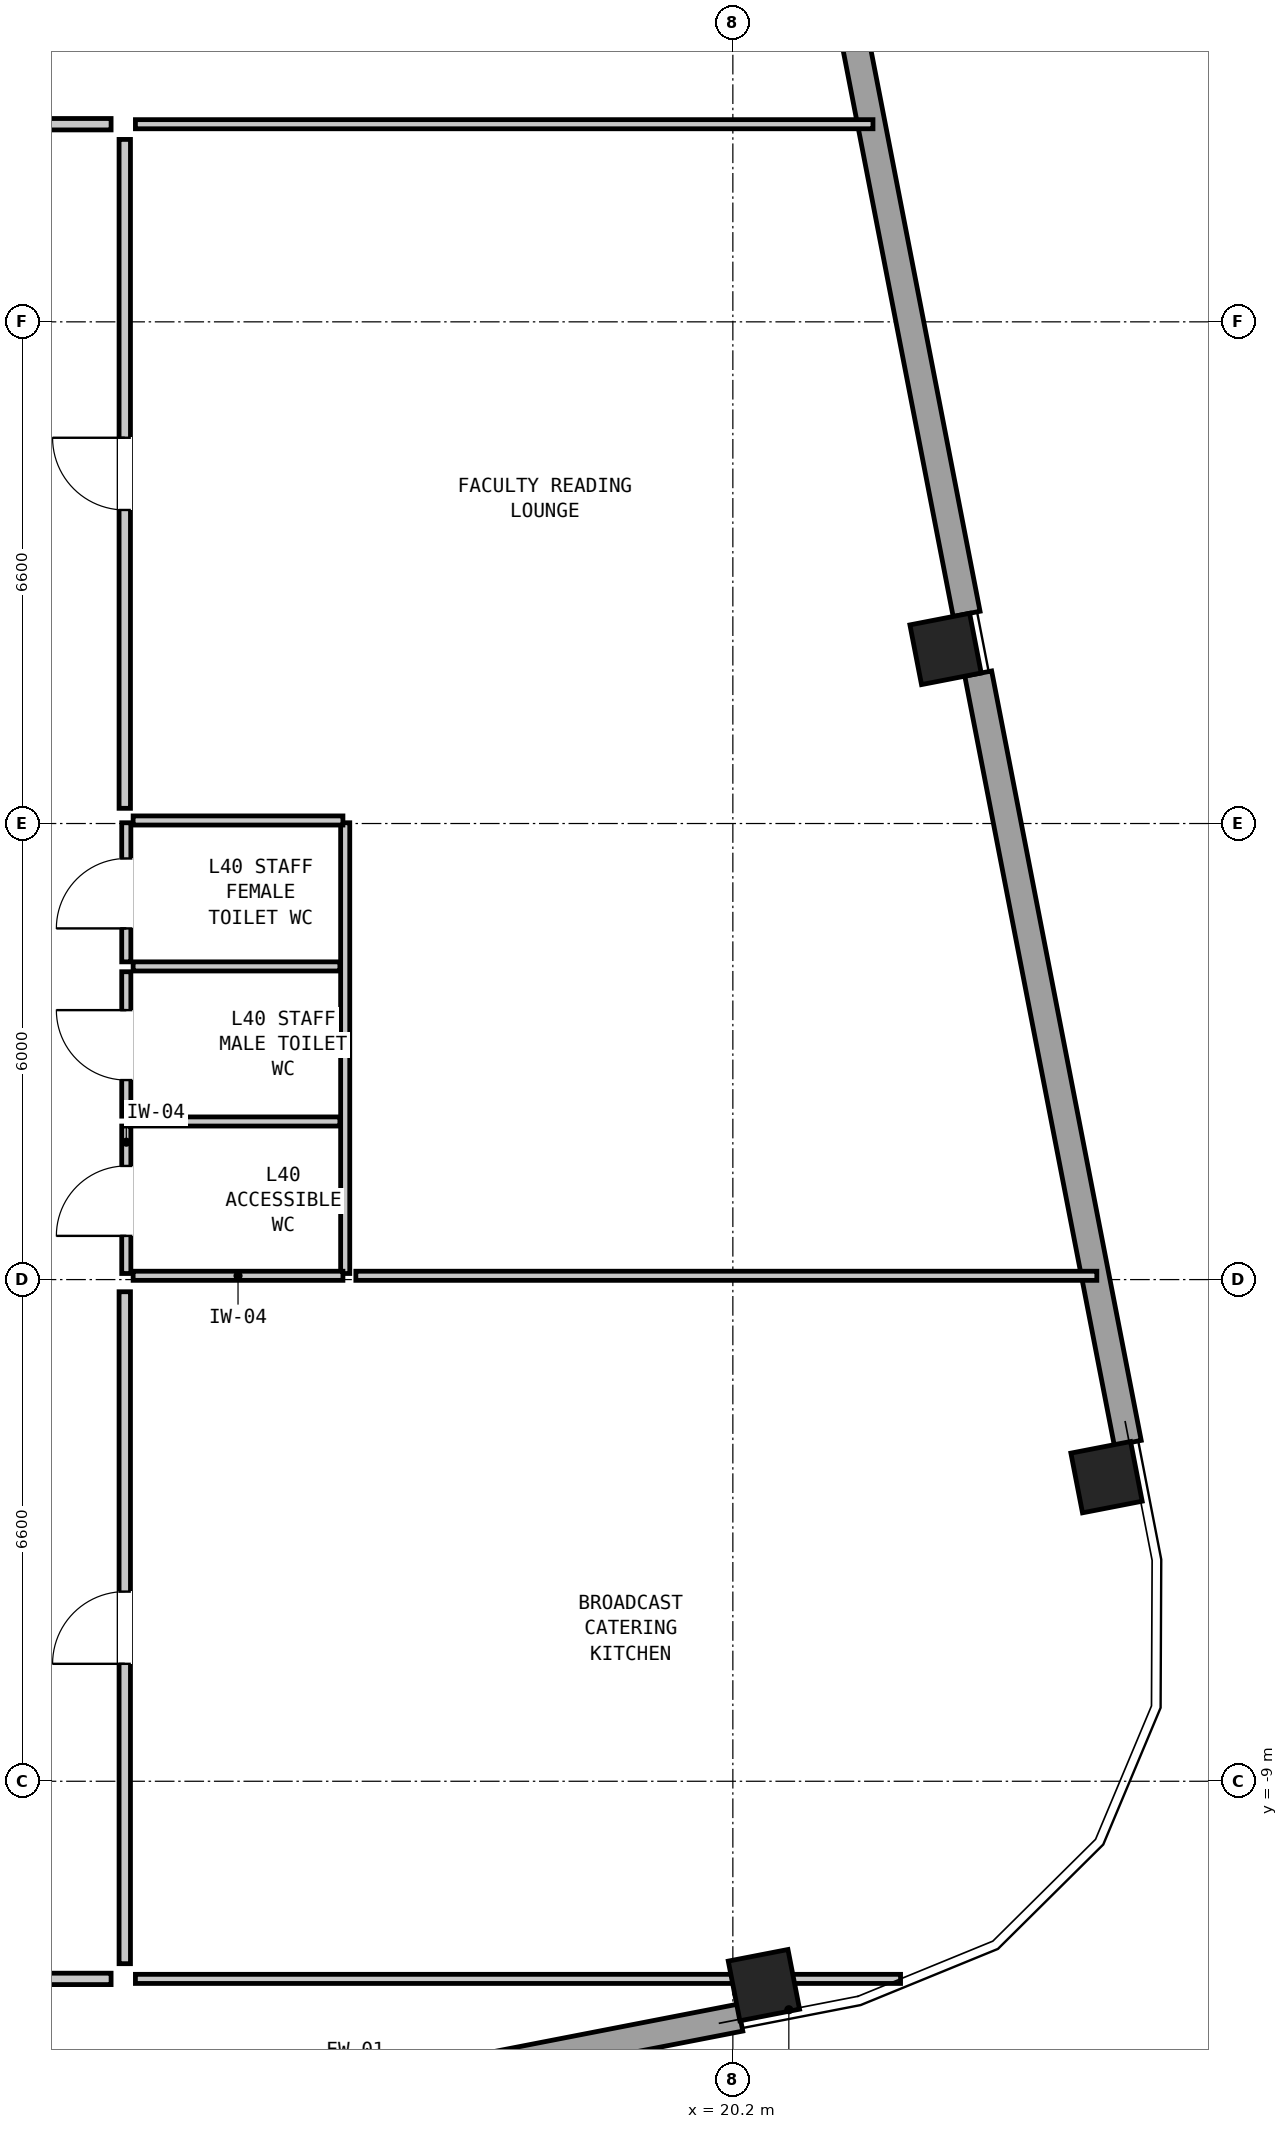
"""IFC4 building model, lengths in metres.
Left out: names, types, materials, properties, quantities, classifications, styles, units other than length and angle.
Written with IfcOpenShell. Run it as: python <this file> out.ifc"""

import sys

from ifc_helpers import new_model, si_unit, direction, frame, frame_2d, origin, origin_2d, place, context, subcontext, project, spatial, rectangle, hollow_rectangle, extrude, element, fill, save


model = new_model("IFC4")
c1 = context("Model", 3, precision=1e-05, world=origin(), true_north=direction((0.0, 1.0)))
c2 = subcontext(c1, "Body", "Model", "MODEL_VIEW")
j1 = project(units=[si_unit("LENGTHUNIT", "METRE"), si_unit("PLANEANGLEUNIT", "RADIAN")], contexts=[c1])
p1 = place(None, origin())
s1 = spatial("IfcSite", under=j1, at=p1, CompositionType="ELEMENT")
p2 = place(p1, origin())
s2 = spatial("IfcBuilding", under=s1, at=p2, CompositionType="ELEMENT")
p3 = place(p2, frame((0.0, 0.0, 137.2)))
s3 = spatial("IfcBuildingStorey", under=s2, at=p3, CompositionType="ELEMENT", Elevation=137.2)
for number, where, z_axis, x_axis in (
    (1, (20.609, -11.682, 0.0), (0.0, 0.0, 1.0), (0.982, 0.191, 0.0)),
    (2, (25.116, -5.0, 0.0), (0.0, 0.0, 1.0), (-0.191, 0.982, 0.0)),
    (3, (22.998, 5.896, 0.0), (0.0, 0.0, 1.0), (-0.191, 0.982, 0.0)),
):
    element("IfcColumn", number, at=place(p3, frame(where, z_axis=z_axis, x_axis=x_axis)), inside=s3, PredefinedType="COLUMN", context=c2, shape_type="SweptSolid", body=[
        extrude(hollow_rectangle(XDim=0.8, YDim=0.8, WallThickness=0.05, at=origin_2d()), origin(), (0.0, 0.0, 1.0), 3.05),
    ])
p4 = place(p3, frame((20.296, -12.11, 0.0), z_axis=(0.0, 0.0, 1.0), x_axis=(-0.981628941133, -0.190799952646, 0.0)))
e4 = element("IfcWall", 4, at=p4, inside=s3, PredefinedType="SOLIDWALL", context=c2, shape_type="SweptSolid", body=[
    extrude(rectangle(XDim=10.312, YDim=0.36, at=frame_2d((5.156, 0.0))), origin(), (0.0, 0.0, 1.0), 0.95),
])
p5 = place(p3, frame((21.31, 16.469, 0.0), z_axis=(0.0, 0.0, 1.0), x_axis=(0.190811924826, -0.981626614016, 0.0)))
e5 = element("IfcWall", 5, at=p5, inside=s3, PredefinedType="SOLIDWALL", context=c2, shape_type="SweptSolid", body=[
    extrude(rectangle(XDim=10.3, YDim=0.36, at=frame_2d((5.15, 0.0))), origin(), (0.0, 0.0, 1.0), 0.95),
])
p6 = place(p3, frame((23.428, 5.573, 0.0), z_axis=(0.0, 0.0, 1.0), x_axis=(0.190827200853, -0.981623644486, 0.0)))
e6 = element("IfcWall", 6, at=p6, inside=s3, PredefinedType="SOLIDWALL", context=c2, shape_type="SweptSolid", body=[
    extrude(rectangle(XDim=10.312, YDim=0.36, at=frame_2d((5.156, 0.0))), origin(), (0.0, 0.0, 1.0), 0.95),
])
p7 = place(p3, frame((12.22, -2.32, 0.0), z_axis=(0.0, 0.0, 1.0), x_axis=(0.0, 1.0, 0.0)))
e7 = element("IfcWall", 7, at=p7, inside=s3, PredefinedType="PARTITIONING", context=c2, shape_type="SweptSolid", body=[
    extrude(rectangle(XDim=1.94, YDim=0.12, at=frame_2d((0.97, 0.0))), origin(), (0.0, 0.0, 1.0), 2.83),
])
p8 = place(p7, frame((0.495, 0.0, 0.0)))
e8 = element("IfcOpeningElement", 8, at=p8, cuts=e7, PredefinedType="OPENING", context=c2, shape_type="SweptSolid", body=[
    extrude(rectangle(XDim=0.92, YDim=2.1, at=frame_2d((0.46, 1.05))), frame((0.0, 0.072, 0.0), z_axis=(0.0, -1.0, 0.0), x_axis=(1.0, 0.0, 0.0)), (0.0, 0.0, 1.0), 0.144),
])
p9 = place(p3, frame((12.22, -0.25, 0.0), z_axis=(0.0, 0.0, 1.0), x_axis=(0.0, 1.0, 0.0)))
e9 = element("IfcWall", 9, at=p9, inside=s3, PredefinedType="PARTITIONING", context=c2, shape_type="SweptSolid", body=[
    extrude(rectangle(XDim=1.9, YDim=0.12, at=frame_2d((0.95, 0.0))), origin(), (0.0, 0.0, 1.0), 2.83),
])
p10 = place(p9, frame((0.475, 0.0, 0.0)))
e10 = element("IfcOpeningElement", 10, at=p10, cuts=e9, PredefinedType="OPENING", context=c2, shape_type="SweptSolid", body=[
    extrude(rectangle(XDim=0.92, YDim=2.1, at=frame_2d((0.46, 1.05))), frame((0.0, 0.072, 0.0), z_axis=(0.0, -1.0, 0.0), x_axis=(1.0, 0.0, 0.0)), (0.0, 0.0, 1.0), 0.144),
])
p11 = place(p3, frame((12.22, 1.78, 0.0), z_axis=(0.0, 0.0, 1.0), x_axis=(0.0, 1.0, 0.0)))
e11 = element("IfcWall", 11, at=p11, inside=s3, PredefinedType="PARTITIONING", context=c2, shape_type="SweptSolid", body=[
    extrude(rectangle(XDim=1.83, YDim=0.12, at=frame_2d((0.915, 0.0))), origin(), (0.0, 0.0, 1.0), 2.83),
])
p12 = place(p11, frame((0.44, 0.0, 0.0)))
e12 = element("IfcOpeningElement", 12, at=p12, cuts=e11, PredefinedType="OPENING", context=c2, shape_type="SweptSolid", body=[
    extrude(rectangle(XDim=0.92, YDim=2.1, at=frame_2d((0.46, 1.05))), frame((0.0, 0.072, 0.0), z_axis=(0.0, -1.0, 0.0), x_axis=(1.0, 0.0, 0.0)), (0.0, 0.0, 1.0), 0.144),
])
p13 = place(p3, frame((15.1, -2.32, 0.0), z_axis=(0.0, 0.0, 1.0), x_axis=(0.0, 1.0, 0.0)))
e13 = element("IfcWall", 13, at=p13, inside=s3, PredefinedType="PARTITIONING", context=c2, shape_type="SweptSolid", body=[
    extrude(rectangle(XDim=5.93, YDim=0.12, at=frame_2d((2.965, 0.0))), origin(), (0.0, 0.0, 1.0), 2.83),
])
for number, where, z_axis, x_axis in (
    (14, (12.31, -2.35, 0.0), (0.0, 0.0, 1.0), (1.0, 0.0, 0.0)),
    (15, (12.31, 3.64, 0.0), (0.0, 0.0, 1.0), (1.0, 0.0, 0.0)),
):
    element("IfcWall", number, at=place(p3, frame(where, z_axis=z_axis, x_axis=x_axis)), inside=s3, PredefinedType="PARTITIONING", context=c2, shape_type="SweptSolid", body=[
        extrude(rectangle(XDim=2.76, YDim=0.12, at=frame_2d((1.38, 0.0))), origin(), (0.0, 0.0, 1.0), 1.01),
    ])
for number, where, z_axis, x_axis in (
    (16, (12.31, -0.32, 0.0), (0.0, 0.0, 1.0), (1.0, 0.0, 0.0)),
    (17, (12.31, 1.72, 0.0), (0.0, 0.0, 1.0), (1.0, 0.0, 0.0)),
):
    element("IfcWall", number, at=place(p3, frame(where, z_axis=z_axis, x_axis=x_axis)), inside=s3, PredefinedType="PARTITIONING", context=c2, shape_type="SweptSolid", body=[
        extrude(rectangle(XDim=2.72, YDim=0.12, at=frame_2d((1.36, 0.0))), origin(), (0.0, 0.0, 1.0), 2.83),
    ])
p14 = place(p3, frame((12.34, 12.8, 0.0), z_axis=(0.0, 0.0, 1.0), x_axis=(1.0, 0.0, 0.0)))
e18 = element("IfcWall", 18, at=p14, inside=s3, PredefinedType="PARTITIONING", context=c2, shape_type="SweptSolid", body=[
    extrude(rectangle(XDim=9.703, YDim=0.12, at=frame_2d((4.852, 0.0))), origin(), (0.0, 0.0, 1.0), 2.83),
])
p15 = place(p3, frame((12.34, -11.6, 0.0), z_axis=(0.0, 0.0, 1.0), x_axis=(1.0, 0.0, 0.0)))
e19 = element("IfcWall", 19, at=p15, inside=s3, PredefinedType="PARTITIONING", context=c2, shape_type="SweptSolid", body=[
    extrude(rectangle(XDim=10.066, YDim=0.12, at=frame_2d((5.033, 0.0))), origin(), (0.0, 0.0, 1.0), 1.01),
])
p16 = place(p3, frame((15.24, -2.35, 0.0), z_axis=(0.0, 0.0, 1.0), x_axis=(1.0, 0.0, 0.0)))
e20 = element("IfcWall", 20, at=p16, inside=s3, PredefinedType="PARTITIONING", context=c2, shape_type="SweptSolid", body=[
    extrude(rectangle(XDim=9.748, YDim=0.12, at=frame_2d((4.874, 0.0))), origin(), (0.0, 0.0, 1.0), 1.01),
])
p17 = place(p3, frame((5.58, 12.8, 0.0), z_axis=(0.0, 0.0, 1.0), x_axis=(1.0, 0.0, 0.0)))
e21 = element("IfcWall", 21, at=p17, inside=s3, PredefinedType="PARTITIONING", context=c2, shape_type="SweptSolid", body=[
    extrude(rectangle(XDim=6.44, YDim=0.15, at=frame_2d((3.22, 0.0))), origin(), (0.0, 0.0, 1.0), 2.83),
])
p18 = place(p17, frame((2.22, 0.0, 0.0)))
e22 = element("IfcOpeningElement", 22, at=p18, cuts=e21, PredefinedType="OPENING", context=c2, shape_type="SweptSolid", body=[
    extrude(rectangle(XDim=1.2, YDim=2.1, at=frame_2d((0.6, 1.05))), frame((0.0, 0.087, 0.0), z_axis=(0.0, -1.0, 0.0), x_axis=(1.0, 0.0, 0.0)), (0.0, 0.0, 1.0), 0.174),
])
p19 = place(p3, frame((0.18, -11.6, 0.0), z_axis=(0.0, 0.0, 1.0), x_axis=(1.0, 0.0, 0.0)))
e23 = element("IfcWall", 23, at=p19, inside=s3, PredefinedType="PARTITIONING", context=c2, shape_type="SweptSolid", body=[
    extrude(rectangle(XDim=11.84, YDim=0.15, at=frame_2d((5.92, 0.0))), origin(), (0.0, 0.0, 1.0), 2.347),
])
p20 = place(p19, frame((5.32, 0.0, 0.0)))
e24 = element("IfcOpeningElement", 24, at=p20, cuts=e23, PredefinedType="OPENING", context=c2, shape_type="SweptSolid", body=[
    extrude(rectangle(XDim=1.2, YDim=2.1, at=frame_2d((0.6, 1.05))), frame((0.0, 0.087, 0.0), z_axis=(0.0, -1.0, 0.0), x_axis=(1.0, 0.0, 0.0)), (0.0, 0.0, 1.0), 0.174),
])
p21 = place(p3, frame((12.2, -11.4, 0.0), z_axis=(0.0, 0.0, 1.0), x_axis=(0.0, 1.0, 0.0)))
e25 = element("IfcWall", 25, at=p21, inside=s3, PredefinedType="PARTITIONING", context=c2, shape_type="SweptSolid", body=[
    extrude(rectangle(XDim=8.84, YDim=0.15, at=frame_2d((4.42, 0.0))), origin(), (0.0, 0.0, 1.0), 2.83),
])
p22 = place(p21, frame((3.945, 0.0, 0.0)))
e26 = element("IfcOpeningElement", 26, at=p22, cuts=e25, PredefinedType="OPENING", context=c2, shape_type="SweptSolid", body=[
    extrude(rectangle(XDim=0.95, YDim=2.1, at=frame_2d((0.475, 1.05))), frame((0.0, 0.087, 0.0), z_axis=(0.0, -1.0, 0.0), x_axis=(1.0, 0.0, 0.0)), (0.0, 0.0, 1.0), 0.174),
])
p23 = place(p3, frame((12.2, 3.8, 0.0), z_axis=(0.0, 0.0, 1.0), x_axis=(0.0, 1.0, 0.0)))
e27 = element("IfcWall", 27, at=p23, inside=s3, PredefinedType="PARTITIONING", context=c2, shape_type="SweptSolid", body=[
    extrude(rectangle(XDim=8.8, YDim=0.15, at=frame_2d((4.4, 0.0))), origin(), (0.0, 0.0, 1.0), 2.83),
])
p24 = place(p23, frame((3.925, 0.0, 0.0)))
e28 = element("IfcOpeningElement", 28, at=p24, cuts=e27, PredefinedType="OPENING", context=c2, shape_type="SweptSolid", body=[
    extrude(rectangle(XDim=0.95, YDim=2.1, at=frame_2d((0.475, 1.05))), frame((0.0, 0.087, 0.0), z_axis=(0.0, -1.0, 0.0), x_axis=(1.0, 0.0, 0.0)), (0.0, 0.0, 1.0), 0.174),
])
p25 = place(p8, origin())
e29 = element("IfcDoor", 29, at=p25, inside=s3, OperationType="SINGLE_SWING_LEFT", PredefinedType="DOOR", context=c2, shape_type="SweptSolid", body=[
    extrude(rectangle(XDim=0.92, YDim=2.1, at=frame_2d((0.46, 1.05))), frame((0.0, 0.025, 0.0), z_axis=(0.0, -1.0, 0.0), x_axis=(1.0, 0.0, 0.0)), (0.0, 0.0, 1.0), 0.05),
])
fill(e8, e29)
p26 = place(p10, origin())
e30 = element("IfcDoor", 30, at=p26, inside=s3, OperationType="SINGLE_SWING_RIGHT", PredefinedType="DOOR", context=c2, shape_type="SweptSolid", body=[
    extrude(rectangle(XDim=0.92, YDim=2.1, at=frame_2d((0.46, 1.05))), frame((0.0, 0.025, 0.0), z_axis=(0.0, -1.0, 0.0), x_axis=(1.0, 0.0, 0.0)), (0.0, 0.0, 1.0), 0.05),
])
fill(e10, e30)
p27 = place(p12, origin())
e31 = element("IfcDoor", 31, at=p27, inside=s3, OperationType="SINGLE_SWING_LEFT", PredefinedType="DOOR", context=c2, shape_type="SweptSolid", body=[
    extrude(rectangle(XDim=0.92, YDim=2.1, at=frame_2d((0.46, 1.05))), frame((0.0, 0.025, 0.0), z_axis=(0.0, -1.0, 0.0), x_axis=(1.0, 0.0, 0.0)), (0.0, 0.0, 1.0), 0.05),
])
fill(e12, e31)
p28 = place(p22, origin())
e32 = element("IfcDoor", 32, at=p28, inside=s3, OperationType="SINGLE_SWING_LEFT", PredefinedType="DOOR", context=c2, shape_type="SweptSolid", body=[
    extrude(rectangle(XDim=0.95, YDim=2.1, at=frame_2d((0.475, 1.05))), frame((0.0, 0.025, 0.0), z_axis=(0.0, -1.0, 0.0), x_axis=(1.0, 0.0, 0.0)), (0.0, 0.0, 1.0), 0.05),
])
fill(e26, e32)
p29 = place(p24, origin())
e33 = element("IfcDoor", 33, at=p29, inside=s3, OperationType="SINGLE_SWING_RIGHT", PredefinedType="DOOR", context=c2, shape_type="SweptSolid", body=[
    extrude(rectangle(XDim=0.95, YDim=2.1, at=frame_2d((0.475, 1.05))), frame((0.0, 0.025, 0.0), z_axis=(0.0, -1.0, 0.0), x_axis=(1.0, 0.0, 0.0)), (0.0, 0.0, 1.0), 0.05),
])
fill(e28, e33)
save(model, sys.argv[1])
